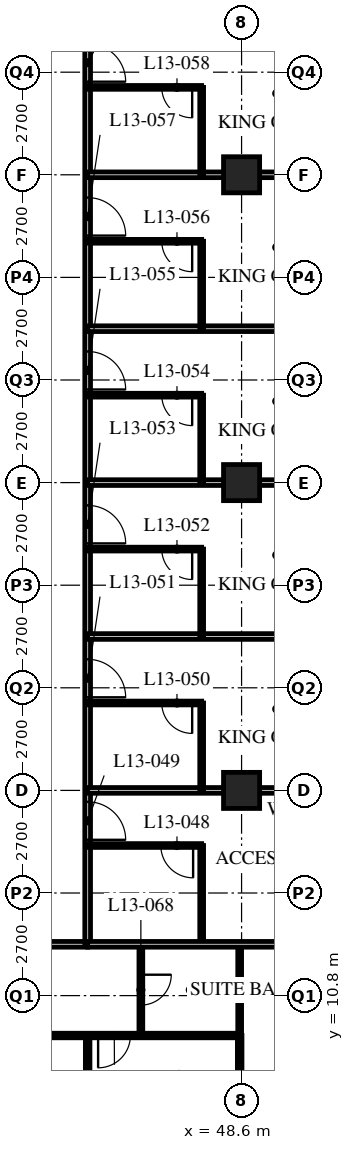
"""IFC4 building model, lengths in metres.
Left out: names, types, materials, properties, quantities, classifications, styles, units other than length and angle.
Written with IfcOpenShell. Run it as: python <this file> out.ifc"""

import sys

from ifc_helpers import new_model, si_unit, direction, frame, frame_2d, origin, origin_2d, place, context, subcontext, project, spatial, rectangle, hollow_rectangle, extrude, element, fill, save


model = new_model("IFC4")
c1 = context("Model", 3, precision=1e-05, world=origin(), true_north=direction((0.0, 1.0)))
c2 = subcontext(c1, "Body", "Model", "MODEL_VIEW")
j1 = project(units=[si_unit("LENGTHUNIT", "METRE"), si_unit("PLANEANGLEUNIT", "RADIAN")], contexts=[c1])
p1 = place(None, origin())
s1 = spatial("IfcSite", under=j1, at=p1, CompositionType="ELEMENT")
p2 = place(p1, origin())
s2 = spatial("IfcBuilding", under=s1, at=p2, CompositionType="ELEMENT")
p3 = place(p2, frame((0.0, 0.0, 56.8)))
s3 = spatial("IfcBuildingStorey", under=s2, at=p3, CompositionType="ELEMENT", Elevation=56.8)
for number, where, z_axis, x_axis in (
    (1, (48.6, 16.2, 0.0), (0.0, 0.0, 1.0), (1.0, 0.0, 0.0)),
    (2, (48.6, 24.3, 0.0), (0.0, 0.0, 1.0), (1.0, 0.0, 0.0)),
    (3, (48.6, 32.4, 0.0), (0.0, 0.0, 1.0), (1.0, 0.0, 0.0)),
):
    element("IfcColumn", number, at=place(p3, frame(where, z_axis=z_axis, x_axis=x_axis)), inside=s3, PredefinedType="COLUMN", context=c2, shape_type="SweptSolid", body=[
        extrude(hollow_rectangle(XDim=0.95, YDim=0.95, WallThickness=0.095, at=origin_2d()), origin(), (0.0, 0.0, 1.0), 3.4),
    ])
p4 = place(p3, frame((12.15, 12.15, 0.0), z_axis=(0.0, 0.0, 1.0), x_axis=(1.0, 0.0, 0.0)))
e4 = element("IfcWall", 4, at=p4, inside=s3, PredefinedType="PARTITIONING", context=c2, shape_type="SweptSolid", body=[
    extrude(rectangle(XDim=32.4, YDim=0.15, at=frame_2d((16.2, 0.0))), origin(), (0.0, 0.0, 1.0), 3.19),
])
p5 = place(p4, frame((6.5, 0.0, 0.0)))
e5 = element("IfcOpeningElement", 5, at=p5, cuts=e4, PredefinedType="OPENING", context=c2, shape_type="SweptSolid", body=[
    extrude(rectangle(XDim=1.0, YDim=2.1, at=frame_2d((0.5, 1.05))), frame((0.0, 0.085, 0.0), z_axis=(0.0, -1.0, 0.0), x_axis=(1.0, 0.0, 0.0)), (0.0, 0.0, 1.0), 0.17),
])
p6 = place(p4, frame((8.4, 0.0, 0.0)))
e6 = element("IfcOpeningElement", 6, at=p6, cuts=e4, PredefinedType="OPENING", context=c2, shape_type="SweptSolid", body=[
    extrude(rectangle(XDim=1.0, YDim=2.1, at=frame_2d((0.5, 1.05))), frame((0.0, 0.085, 0.0), z_axis=(0.0, -1.0, 0.0), x_axis=(1.0, 0.0, 0.0)), (0.0, 0.0, 1.0), 0.17),
])
p7 = place(p4, frame((14.6, 0.0, 0.0)))
e7 = element("IfcOpeningElement", 7, at=p7, cuts=e4, PredefinedType="OPENING", context=c2, shape_type="SweptSolid", body=[
    extrude(rectangle(XDim=1.0, YDim=2.1, at=frame_2d((0.5, 1.05))), frame((0.0, 0.085, 0.0), z_axis=(0.0, -1.0, 0.0), x_axis=(1.0, 0.0, 0.0)), (0.0, 0.0, 1.0), 0.17),
])
p8 = place(p4, frame((18.65, 0.0, 0.0)))
e8 = element("IfcOpeningElement", 8, at=p8, cuts=e4, PredefinedType="OPENING", context=c2, shape_type="SweptSolid", body=[
    extrude(rectangle(XDim=1.0, YDim=2.1, at=frame_2d((0.5, 1.05))), frame((0.0, 0.085, 0.0), z_axis=(0.0, -1.0, 0.0), x_axis=(1.0, 0.0, 0.0)), (0.0, 0.0, 1.0), 0.17),
])
p9 = place(p4, frame((20.55, 0.0, 0.0)))
e9 = element("IfcOpeningElement", 9, at=p9, cuts=e4, PredefinedType="OPENING", context=c2, shape_type="SweptSolid", body=[
    extrude(rectangle(XDim=1.0, YDim=2.1, at=frame_2d((0.5, 1.05))), frame((0.0, 0.085, 0.0), z_axis=(0.0, -1.0, 0.0), x_axis=(1.0, 0.0, 0.0)), (0.0, 0.0, 1.0), 0.17),
])
p10 = place(p4, frame((26.75, 0.0, 0.0)))
e10 = element("IfcOpeningElement", 10, at=p10, cuts=e4, PredefinedType="OPENING", context=c2, shape_type="SweptSolid", body=[
    extrude(rectangle(XDim=1.0, YDim=2.1, at=frame_2d((0.5, 1.05))), frame((0.0, 0.085, 0.0), z_axis=(0.0, -1.0, 0.0), x_axis=(1.0, 0.0, 0.0)), (0.0, 0.0, 1.0), 0.17),
])
p11 = place(p4, frame((1.525, 0.0, 0.0)))
e11 = element("IfcOpeningElement", 11, at=p11, cuts=e4, PredefinedType="OPENING", context=c2, shape_type="SweptSolid", body=[
    extrude(rectangle(XDim=1.0, YDim=2.1, at=frame_2d((0.5, 1.05))), frame((0.0, 0.085, 0.0), z_axis=(0.0, -1.0, 0.0), x_axis=(1.0, 0.0, 0.0)), (0.0, 0.0, 1.0), 0.17),
])
p12 = place(p4, frame((29.875, 0.0, 0.0)))
e12 = element("IfcOpeningElement", 12, at=p12, cuts=e4, PredefinedType="OPENING", context=c2, shape_type="SweptSolid", body=[
    extrude(rectangle(XDim=1.0, YDim=2.1, at=frame_2d((0.5, 1.05))), frame((0.0, 0.085, 0.0), z_axis=(0.0, -1.0, 0.0), x_axis=(1.0, 0.0, 0.0)), (0.0, 0.0, 1.0), 0.17),
])
p13 = place(p3, frame((44.55, 12.15, 0.0), z_axis=(0.0, 0.0, 1.0), x_axis=(0.0, 1.0, 0.0)))
e13 = element("IfcWall", 13, at=p13, inside=s3, PredefinedType="PARTITIONING", context=c2, shape_type="SweptSolid", body=[
    extrude(rectangle(XDim=30.15, YDim=0.15, at=frame_2d((15.075, 0.0))), origin(), (0.0, 0.0, 1.0), 3.19),
])
p14 = place(p13, frame((2.75, 0.0, 0.0)))
e14 = element("IfcOpeningElement", 14, at=p14, cuts=e13, PredefinedType="OPENING", context=c2, shape_type="SweptSolid", body=[
    extrude(rectangle(XDim=1.0, YDim=2.1, at=frame_2d((0.5, 1.05))), frame((0.0, 0.085, 0.0), z_axis=(0.0, -1.0, 0.0), x_axis=(1.0, 0.0, 0.0)), (0.0, 0.0, 1.0), 0.17),
])
p15 = place(p13, frame((6.5, 0.0, 0.0)))
e15 = element("IfcOpeningElement", 15, at=p15, cuts=e13, PredefinedType="OPENING", context=c2, shape_type="SweptSolid", body=[
    extrude(rectangle(XDim=1.0, YDim=2.1, at=frame_2d((0.5, 1.05))), frame((0.0, 0.085, 0.0), z_axis=(0.0, -1.0, 0.0), x_axis=(1.0, 0.0, 0.0)), (0.0, 0.0, 1.0), 0.17),
])
p16 = place(p13, frame((10.55, 0.0, 0.0)))
e16 = element("IfcOpeningElement", 16, at=p16, cuts=e13, PredefinedType="OPENING", context=c2, shape_type="SweptSolid", body=[
    extrude(rectangle(XDim=1.0, YDim=2.1, at=frame_2d((0.5, 1.05))), frame((0.0, 0.085, 0.0), z_axis=(0.0, -1.0, 0.0), x_axis=(1.0, 0.0, 0.0)), (0.0, 0.0, 1.0), 0.17),
])
p17 = place(p13, frame((14.6, 0.0, 0.0)))
e17 = element("IfcOpeningElement", 17, at=p17, cuts=e13, PredefinedType="OPENING", context=c2, shape_type="SweptSolid", body=[
    extrude(rectangle(XDim=1.0, YDim=2.1, at=frame_2d((0.5, 1.05))), frame((0.0, 0.085, 0.0), z_axis=(0.0, -1.0, 0.0), x_axis=(1.0, 0.0, 0.0)), (0.0, 0.0, 1.0), 0.17),
])
p18 = place(p13, frame((18.65, 0.0, 0.0)))
e18 = element("IfcOpeningElement", 18, at=p18, cuts=e13, PredefinedType="OPENING", context=c2, shape_type="SweptSolid", body=[
    extrude(rectangle(XDim=1.0, YDim=2.1, at=frame_2d((0.5, 1.05))), frame((0.0, 0.085, 0.0), z_axis=(0.0, -1.0, 0.0), x_axis=(1.0, 0.0, 0.0)), (0.0, 0.0, 1.0), 0.17),
])
p19 = place(p13, frame((22.7, 0.0, 0.0)))
e19 = element("IfcOpeningElement", 19, at=p19, cuts=e13, PredefinedType="OPENING", context=c2, shape_type="SweptSolid", body=[
    extrude(rectangle(XDim=1.0, YDim=2.1, at=frame_2d((0.5, 1.05))), frame((0.0, 0.085, 0.0), z_axis=(0.0, -1.0, 0.0), x_axis=(1.0, 0.0, 0.0)), (0.0, 0.0, 1.0), 0.17),
])
p20 = place(p13, frame((26.7, 0.0, 0.0)))
e20 = element("IfcOpeningElement", 20, at=p20, cuts=e13, PredefinedType="OPENING", context=c2, shape_type="SweptSolid", body=[
    extrude(rectangle(XDim=1.0, YDim=2.1, at=frame_2d((0.5, 1.05))), frame((0.0, 0.085, 0.0), z_axis=(0.0, -1.0, 0.0), x_axis=(1.0, 0.0, 0.0)), (0.0, 0.0, 1.0), 0.17),
])
p21 = place(p3, frame((47.55, 12.15, 0.0), z_axis=(0.0, 0.0, 1.0), x_axis=(0.0, 1.0, 0.0)))
e21 = element("IfcWall", 21, at=p21, inside=s3, PredefinedType="PARTITIONING", context=c2, shape_type="SweptSolid", body=[
    extrude(rectangle(XDim=2.6, YDim=0.1, at=frame_2d((1.3, 0.0))), origin(), (0.0, 0.0, 1.0), 3.19),
])
p22 = place(p3, frame((44.55, 14.75, 0.0), z_axis=(0.0, 0.0, 1.0), x_axis=(1.0, 0.0, 0.0)))
e22 = element("IfcWall", 22, at=p22, inside=s3, PredefinedType="PARTITIONING", context=c2, shape_type="SweptSolid", body=[
    extrude(rectangle(XDim=3.0, YDim=0.1, at=frame_2d((1.5, 0.0))), origin(), (0.0, 0.0, 1.0), 3.19),
])
p23 = place(p22, frame((1.925, 0.0, 0.0)))
e23 = element("IfcOpeningElement", 23, at=p23, cuts=e22, PredefinedType="OPENING", context=c2, shape_type="SweptSolid", body=[
    extrude(rectangle(XDim=0.85, YDim=2.1, at=frame_2d((0.425, 1.05))), frame((0.0, 0.06, 0.0), z_axis=(0.0, -1.0, 0.0), x_axis=(1.0, 0.0, 0.0)), (0.0, 0.0, 1.0), 0.12),
])
p24 = place(p3, frame((44.55, 16.2, 0.0), z_axis=(0.0, 0.0, 1.0), x_axis=(1.0, 0.0, 0.0)))
e24 = element("IfcWall", 24, at=p24, inside=s3, PredefinedType="PARTITIONING", context=c2, shape_type="SweptSolid", body=[
    extrude(rectangle(XDim=11.85, YDim=0.15, at=frame_2d((5.925, 0.0))), origin(), (0.0, 0.0, 1.0), 2.578),
])
p25 = place(p3, frame((47.55, 16.2, 0.0), z_axis=(0.0, 0.0, 1.0), x_axis=(0.0, 1.0, 0.0)))
e25 = element("IfcWall", 25, at=p25, inside=s3, PredefinedType="PARTITIONING", context=c2, shape_type="SweptSolid", body=[
    extrude(rectangle(XDim=2.3, YDim=0.1, at=frame_2d((1.15, 0.0))), origin(), (0.0, 0.0, 1.0), 3.19),
])
p26 = place(p3, frame((44.55, 18.5, 0.0), z_axis=(0.0, 0.0, 1.0), x_axis=(1.0, 0.0, 0.0)))
e26 = element("IfcWall", 26, at=p26, inside=s3, PredefinedType="PARTITIONING", context=c2, shape_type="SweptSolid", body=[
    extrude(rectangle(XDim=3.0, YDim=0.1, at=frame_2d((1.5, 0.0))), origin(), (0.0, 0.0, 1.0), 3.19),
])
p27 = place(p26, frame((1.95, 0.0, 0.0)))
e27 = element("IfcOpeningElement", 27, at=p27, cuts=e26, PredefinedType="OPENING", context=c2, shape_type="SweptSolid", body=[
    extrude(rectangle(XDim=0.8, YDim=2.1, at=frame_2d((0.4, 1.05))), frame((0.0, 0.06, 0.0), z_axis=(0.0, -1.0, 0.0), x_axis=(1.0, 0.0, 0.0)), (0.0, 0.0, 1.0), 0.12),
])
p28 = place(p3, frame((44.55, 20.25, 0.0), z_axis=(0.0, 0.0, 1.0), x_axis=(1.0, 0.0, 0.0)))
e28 = element("IfcWall", 28, at=p28, inside=s3, PredefinedType="PARTITIONING", context=c2, shape_type="SweptSolid", body=[
    extrude(rectangle(XDim=11.85, YDim=0.15, at=frame_2d((5.925, 0.0))), origin(), (0.0, 0.0, 1.0), 3.19),
])
p29 = place(p3, frame((47.55, 20.25, 0.0), z_axis=(0.0, 0.0, 1.0), x_axis=(0.0, 1.0, 0.0)))
e29 = element("IfcWall", 29, at=p29, inside=s3, PredefinedType="PARTITIONING", context=c2, shape_type="SweptSolid", body=[
    extrude(rectangle(XDim=2.3, YDim=0.1, at=frame_2d((1.15, 0.0))), origin(), (0.0, 0.0, 1.0), 3.19),
])
p30 = place(p3, frame((44.55, 22.55, 0.0), z_axis=(0.0, 0.0, 1.0), x_axis=(1.0, 0.0, 0.0)))
e30 = element("IfcWall", 30, at=p30, inside=s3, PredefinedType="PARTITIONING", context=c2, shape_type="SweptSolid", body=[
    extrude(rectangle(XDim=3.0, YDim=0.1, at=frame_2d((1.5, 0.0))), origin(), (0.0, 0.0, 1.0), 3.19),
])
p31 = place(p30, frame((1.95, 0.0, 0.0)))
e31 = element("IfcOpeningElement", 31, at=p31, cuts=e30, PredefinedType="OPENING", context=c2, shape_type="SweptSolid", body=[
    extrude(rectangle(XDim=0.8, YDim=2.1, at=frame_2d((0.4, 1.05))), frame((0.0, 0.06, 0.0), z_axis=(0.0, -1.0, 0.0), x_axis=(1.0, 0.0, 0.0)), (0.0, 0.0, 1.0), 0.12),
])
p32 = place(p3, frame((44.55, 24.3, 0.0), z_axis=(0.0, 0.0, 1.0), x_axis=(1.0, 0.0, 0.0)))
e32 = element("IfcWall", 32, at=p32, inside=s3, PredefinedType="PARTITIONING", context=c2, shape_type="SweptSolid", body=[
    extrude(rectangle(XDim=11.85, YDim=0.15, at=frame_2d((5.925, 0.0))), origin(), (0.0, 0.0, 1.0), 2.578),
])
p33 = place(p3, frame((47.55, 24.3, 0.0), z_axis=(0.0, 0.0, 1.0), x_axis=(0.0, 1.0, 0.0)))
e33 = element("IfcWall", 33, at=p33, inside=s3, PredefinedType="PARTITIONING", context=c2, shape_type="SweptSolid", body=[
    extrude(rectangle(XDim=2.3, YDim=0.1, at=frame_2d((1.15, 0.0))), origin(), (0.0, 0.0, 1.0), 3.19),
])
p34 = place(p3, frame((44.55, 26.6, 0.0), z_axis=(0.0, 0.0, 1.0), x_axis=(1.0, 0.0, 0.0)))
e34 = element("IfcWall", 34, at=p34, inside=s3, PredefinedType="PARTITIONING", context=c2, shape_type="SweptSolid", body=[
    extrude(rectangle(XDim=3.0, YDim=0.1, at=frame_2d((1.5, 0.0))), origin(), (0.0, 0.0, 1.0), 3.19),
])
p35 = place(p34, frame((1.95, 0.0, 0.0)))
e35 = element("IfcOpeningElement", 35, at=p35, cuts=e34, PredefinedType="OPENING", context=c2, shape_type="SweptSolid", body=[
    extrude(rectangle(XDim=0.8, YDim=2.1, at=frame_2d((0.4, 1.05))), frame((0.0, 0.06, 0.0), z_axis=(0.0, -1.0, 0.0), x_axis=(1.0, 0.0, 0.0)), (0.0, 0.0, 1.0), 0.12),
])
p36 = place(p3, frame((44.55, 28.35, 0.0), z_axis=(0.0, 0.0, 1.0), x_axis=(1.0, 0.0, 0.0)))
e36 = element("IfcWall", 36, at=p36, inside=s3, PredefinedType="PARTITIONING", context=c2, shape_type="SweptSolid", body=[
    extrude(rectangle(XDim=11.85, YDim=0.15, at=frame_2d((5.925, 0.0))), origin(), (0.0, 0.0, 1.0), 3.19),
])
p37 = place(p3, frame((47.55, 28.35, 0.0), z_axis=(0.0, 0.0, 1.0), x_axis=(0.0, 1.0, 0.0)))
e37 = element("IfcWall", 37, at=p37, inside=s3, PredefinedType="PARTITIONING", context=c2, shape_type="SweptSolid", body=[
    extrude(rectangle(XDim=2.3, YDim=0.1, at=frame_2d((1.15, 0.0))), origin(), (0.0, 0.0, 1.0), 3.19),
])
p38 = place(p3, frame((44.55, 30.65, 0.0), z_axis=(0.0, 0.0, 1.0), x_axis=(1.0, 0.0, 0.0)))
e38 = element("IfcWall", 38, at=p38, inside=s3, PredefinedType="PARTITIONING", context=c2, shape_type="SweptSolid", body=[
    extrude(rectangle(XDim=3.0, YDim=0.1, at=frame_2d((1.5, 0.0))), origin(), (0.0, 0.0, 1.0), 3.19),
])
p39 = place(p38, frame((1.95, 0.0, 0.0)))
e39 = element("IfcOpeningElement", 39, at=p39, cuts=e38, PredefinedType="OPENING", context=c2, shape_type="SweptSolid", body=[
    extrude(rectangle(XDim=0.8, YDim=2.1, at=frame_2d((0.4, 1.05))), frame((0.0, 0.06, 0.0), z_axis=(0.0, -1.0, 0.0), x_axis=(1.0, 0.0, 0.0)), (0.0, 0.0, 1.0), 0.12),
])
p40 = place(p3, frame((44.55, 32.4, 0.0), z_axis=(0.0, 0.0, 1.0), x_axis=(1.0, 0.0, 0.0)))
e40 = element("IfcWall", 40, at=p40, inside=s3, PredefinedType="PARTITIONING", context=c2, shape_type="SweptSolid", body=[
    extrude(rectangle(XDim=11.85, YDim=0.15, at=frame_2d((5.925, 0.0))), origin(), (0.0, 0.0, 1.0), 2.578),
])
p41 = place(p3, frame((47.55, 32.4, 0.0), z_axis=(0.0, 0.0, 1.0), x_axis=(0.0, 1.0, 0.0)))
e41 = element("IfcWall", 41, at=p41, inside=s3, PredefinedType="PARTITIONING", context=c2, shape_type="SweptSolid", body=[
    extrude(rectangle(XDim=2.3, YDim=0.1, at=frame_2d((1.15, 0.0))), origin(), (0.0, 0.0, 1.0), 3.19),
])
p42 = place(p3, frame((44.55, 34.7, 0.0), z_axis=(0.0, 0.0, 1.0), x_axis=(1.0, 0.0, 0.0)))
e42 = element("IfcWall", 42, at=p42, inside=s3, PredefinedType="PARTITIONING", context=c2, shape_type="SweptSolid", body=[
    extrude(rectangle(XDim=3.0, YDim=0.1, at=frame_2d((1.5, 0.0))), origin(), (0.0, 0.0, 1.0), 3.19),
])
p43 = place(p42, frame((1.95, 0.0, 0.0)))
e43 = element("IfcOpeningElement", 43, at=p43, cuts=e42, PredefinedType="OPENING", context=c2, shape_type="SweptSolid", body=[
    extrude(rectangle(XDim=0.8, YDim=2.1, at=frame_2d((0.4, 1.05))), frame((0.0, 0.06, 0.0), z_axis=(0.0, -1.0, 0.0), x_axis=(1.0, 0.0, 0.0)), (0.0, 0.0, 1.0), 0.12),
])
p44 = place(p3, frame((40.5, 9.75, 0.0), z_axis=(0.0, 0.0, 1.0), x_axis=(1.0, 0.0, 0.0)))
e44 = element("IfcWall", 44, at=p44, inside=s3, PredefinedType="PARTITIONING", context=c2, shape_type="SweptSolid", body=[
    extrude(rectangle(XDim=8.05, YDim=0.12, at=frame_2d((4.025, 0.0))), origin(), (0.0, 0.0, 1.0), 3.19),
])
p45 = place(p44, frame((0.475, 0.0, 0.0)))
e45 = element("IfcOpeningElement", 45, at=p45, cuts=e44, PredefinedType="OPENING", context=c2, shape_type="SweptSolid", body=[
    extrude(rectangle(XDim=0.85, YDim=2.1, at=frame_2d((0.425, 1.05))), frame((0.0, 0.07, 0.0), z_axis=(0.0, -1.0, 0.0), x_axis=(1.0, 0.0, 0.0)), (0.0, 0.0, 1.0), 0.14),
])
p46 = place(p44, frame((4.325, 0.0, 0.0)))
e46 = element("IfcOpeningElement", 46, at=p46, cuts=e44, PredefinedType="OPENING", context=c2, shape_type="SweptSolid", body=[
    extrude(rectangle(XDim=0.85, YDim=2.1, at=frame_2d((0.425, 1.05))), frame((0.0, 0.07, 0.0), z_axis=(0.0, -1.0, 0.0), x_axis=(1.0, 0.0, 0.0)), (0.0, 0.0, 1.0), 0.14),
])
p47 = place(p3, frame((45.95, 12.15, 0.0), z_axis=(0.0, 0.0, 1.0), x_axis=(0.0, -1.0, 0.0)))
e47 = element("IfcWall", 47, at=p47, inside=s3, PredefinedType="PARTITIONING", context=c2, shape_type="SweptSolid", body=[
    extrude(rectangle(XDim=2.4, YDim=0.1, at=frame_2d((1.2, 0.0))), origin(), (0.0, 0.0, 1.0), 3.19),
])
p48 = place(p47, frame((0.8, 0.0, 0.0)))
e48 = element("IfcOpeningElement", 48, at=p48, cuts=e47, PredefinedType="OPENING", context=c2, shape_type="SweptSolid", body=[
    extrude(rectangle(XDim=0.8, YDim=2.1, at=frame_2d((0.4, 1.05))), frame((0.0, 0.06, 0.0), z_axis=(0.0, -1.0, 0.0), x_axis=(1.0, 0.0, 0.0)), (0.0, 0.0, 1.0), 0.12),
])
p49 = place(p3, frame((48.55, 12.15, 0.0), z_axis=(0.0, 0.0, 1.0), x_axis=(0.0, -1.0, 0.0)))
e49 = element("IfcWall", 49, at=p49, inside=s3, PredefinedType="PARTITIONING", context=c2, shape_type="SweptSolid", body=[
    extrude(rectangle(XDim=2.4, YDim=0.1, at=frame_2d((1.2, 0.0))), origin(), (0.0, 0.0, 1.0), 2.578),
])
p50 = place(p3, frame((44.55, 9.75, 0.0), z_axis=(0.0, 0.0, 1.0), x_axis=(0.0, -1.0, 0.0)))
e50 = element("IfcWall", 50, at=p50, inside=s3, PredefinedType="PARTITIONING", context=c2, shape_type="SweptSolid", body=[
    extrude(rectangle(XDim=9.45, YDim=0.12, at=frame_2d((4.725, 0.0))), origin(), (0.0, 0.0, 1.0), 3.19),
])
p51 = place(p3, frame((44.55, 12.15, 0.0), z_axis=(0.0, 0.0, 1.0), x_axis=(1.0, 0.0, 0.0)))
e51 = element("IfcWall", 51, at=p51, inside=s3, PredefinedType="PARTITIONING", context=c2, shape_type="SweptSolid", body=[
    extrude(rectangle(XDim=11.85, YDim=0.15, at=frame_2d((5.925, 0.0))), origin(), (0.0, 0.0, 1.0), 3.19),
])
p52 = place(p3, frame((48.55, 9.75, 0.0), z_axis=(0.0, 0.0, 1.0), x_axis=(0.0, -1.0, 0.0)))
e52 = element("IfcWall", 52, at=p52, inside=s3, PredefinedType="PARTITIONING", context=c2, shape_type="SweptSolid", body=[
    extrude(rectangle(XDim=1.175, YDim=0.12, at=frame_2d((0.587, 0.0))), origin(), (0.0, 0.0, 1.0), 2.578),
])
p53 = place(p23, origin())
e53 = element("IfcDoor", 53, at=p53, inside=s3, OperationType="SINGLE_SWING_LEFT", PredefinedType="DOOR", context=c2, shape_type="SweptSolid", body=[
    extrude(rectangle(XDim=0.85, YDim=2.1, at=frame_2d((0.425, 1.05))), frame((0.0, 0.025, 0.0), z_axis=(0.0, -1.0, 0.0), x_axis=(1.0, 0.0, 0.0)), (0.0, 0.0, 1.0), 0.05),
])
fill(e23, e53)
p54 = place(p14, origin())
e54 = element("IfcDoor", 54, at=p54, inside=s3, OperationType="SINGLE_SWING_RIGHT", PredefinedType="DOOR", context=c2, shape_type="SweptSolid", body=[
    extrude(rectangle(XDim=1.0, YDim=2.1, at=frame_2d((0.5, 1.05))), frame((0.0, 0.025, 0.0), z_axis=(0.0, -1.0, 0.0), x_axis=(1.0, 0.0, 0.0)), (0.0, 0.0, 1.0), 0.05),
])
fill(e14, e54)
p55 = place(p27, origin())
e55 = element("IfcDoor", 55, at=p55, inside=s3, OperationType="SINGLE_SWING_LEFT", PredefinedType="DOOR", context=c2, shape_type="SweptSolid", body=[
    extrude(rectangle(XDim=0.8, YDim=2.1, at=frame_2d((0.4, 1.05))), frame((0.0, 0.025, 0.0), z_axis=(0.0, -1.0, 0.0), x_axis=(1.0, 0.0, 0.0)), (0.0, 0.0, 1.0), 0.05),
])
fill(e27, e55)
p56 = place(p15, origin())
e56 = element("IfcDoor", 56, at=p56, inside=s3, OperationType="SINGLE_SWING_RIGHT", PredefinedType="DOOR", context=c2, shape_type="SweptSolid", body=[
    extrude(rectangle(XDim=1.0, YDim=2.1, at=frame_2d((0.5, 1.05))), frame((0.0, 0.025, 0.0), z_axis=(0.0, -1.0, 0.0), x_axis=(1.0, 0.0, 0.0)), (0.0, 0.0, 1.0), 0.05),
])
fill(e15, e56)
p57 = place(p31, origin())
e57 = element("IfcDoor", 57, at=p57, inside=s3, OperationType="SINGLE_SWING_LEFT", PredefinedType="DOOR", context=c2, shape_type="SweptSolid", body=[
    extrude(rectangle(XDim=0.8, YDim=2.1, at=frame_2d((0.4, 1.05))), frame((0.0, 0.025, 0.0), z_axis=(0.0, -1.0, 0.0), x_axis=(1.0, 0.0, 0.0)), (0.0, 0.0, 1.0), 0.05),
])
fill(e31, e57)
p58 = place(p16, origin())
e58 = element("IfcDoor", 58, at=p58, inside=s3, OperationType="SINGLE_SWING_RIGHT", PredefinedType="DOOR", context=c2, shape_type="SweptSolid", body=[
    extrude(rectangle(XDim=1.0, YDim=2.1, at=frame_2d((0.5, 1.05))), frame((0.0, 0.025, 0.0), z_axis=(0.0, -1.0, 0.0), x_axis=(1.0, 0.0, 0.0)), (0.0, 0.0, 1.0), 0.05),
])
fill(e16, e58)
p59 = place(p35, origin())
e59 = element("IfcDoor", 59, at=p59, inside=s3, OperationType="SINGLE_SWING_LEFT", PredefinedType="DOOR", context=c2, shape_type="SweptSolid", body=[
    extrude(rectangle(XDim=0.8, YDim=2.1, at=frame_2d((0.4, 1.05))), frame((0.0, 0.025, 0.0), z_axis=(0.0, -1.0, 0.0), x_axis=(1.0, 0.0, 0.0)), (0.0, 0.0, 1.0), 0.05),
])
fill(e35, e59)
p60 = place(p17, origin())
e60 = element("IfcDoor", 60, at=p60, inside=s3, OperationType="SINGLE_SWING_RIGHT", PredefinedType="DOOR", context=c2, shape_type="SweptSolid", body=[
    extrude(rectangle(XDim=1.0, YDim=2.1, at=frame_2d((0.5, 1.05))), frame((0.0, 0.025, 0.0), z_axis=(0.0, -1.0, 0.0), x_axis=(1.0, 0.0, 0.0)), (0.0, 0.0, 1.0), 0.05),
])
fill(e17, e60)
p61 = place(p39, origin())
e61 = element("IfcDoor", 61, at=p61, inside=s3, OperationType="SINGLE_SWING_LEFT", PredefinedType="DOOR", context=c2, shape_type="SweptSolid", body=[
    extrude(rectangle(XDim=0.8, YDim=2.1, at=frame_2d((0.4, 1.05))), frame((0.0, 0.025, 0.0), z_axis=(0.0, -1.0, 0.0), x_axis=(1.0, 0.0, 0.0)), (0.0, 0.0, 1.0), 0.05),
])
fill(e39, e61)
p62 = place(p18, origin())
e62 = element("IfcDoor", 62, at=p62, inside=s3, OperationType="SINGLE_SWING_RIGHT", PredefinedType="DOOR", context=c2, shape_type="SweptSolid", body=[
    extrude(rectangle(XDim=1.0, YDim=2.1, at=frame_2d((0.5, 1.05))), frame((0.0, 0.025, 0.0), z_axis=(0.0, -1.0, 0.0), x_axis=(1.0, 0.0, 0.0)), (0.0, 0.0, 1.0), 0.05),
])
fill(e18, e62)
p63 = place(p43, origin())
e63 = element("IfcDoor", 63, at=p63, inside=s3, OperationType="SINGLE_SWING_LEFT", PredefinedType="DOOR", context=c2, shape_type="SweptSolid", body=[
    extrude(rectangle(XDim=0.8, YDim=2.1, at=frame_2d((0.4, 1.05))), frame((0.0, 0.025, 0.0), z_axis=(0.0, -1.0, 0.0), x_axis=(1.0, 0.0, 0.0)), (0.0, 0.0, 1.0), 0.05),
])
fill(e43, e63)
p64 = place(p19, origin())
e64 = element("IfcDoor", 64, at=p64, inside=s3, OperationType="SINGLE_SWING_RIGHT", PredefinedType="DOOR", context=c2, shape_type="SweptSolid", body=[
    extrude(rectangle(XDim=1.0, YDim=2.1, at=frame_2d((0.5, 1.05))), frame((0.0, 0.025, 0.0), z_axis=(0.0, -1.0, 0.0), x_axis=(1.0, 0.0, 0.0)), (0.0, 0.0, 1.0), 0.05),
])
fill(e19, e64)
p65 = place(p48, origin())
e65 = element("IfcDoor", 65, at=p65, inside=s3, OperationType="SINGLE_SWING_LEFT", PredefinedType="DOOR", context=c2, shape_type="SweptSolid", body=[
    extrude(rectangle(XDim=0.8, YDim=2.1, at=frame_2d((0.4, 1.05))), frame((0.0, 0.025, 0.0), z_axis=(0.0, -1.0, 0.0), x_axis=(1.0, 0.0, 0.0)), (0.0, 0.0, 1.0), 0.05),
])
fill(e48, e65)
p66 = place(p46, origin())
e66 = element("IfcDoor", 66, at=p66, inside=s3, OperationType="SINGLE_SWING_RIGHT", PredefinedType="DOOR", context=c2, shape_type="SweptSolid", body=[
    extrude(rectangle(XDim=0.85, YDim=2.1, at=frame_2d((0.425, 1.05))), frame((0.0, 0.025, 0.0), z_axis=(0.0, -1.0, 0.0), x_axis=(1.0, 0.0, 0.0)), (0.0, 0.0, 1.0), 0.05),
])
fill(e46, e66)
save(model, sys.argv[1])
